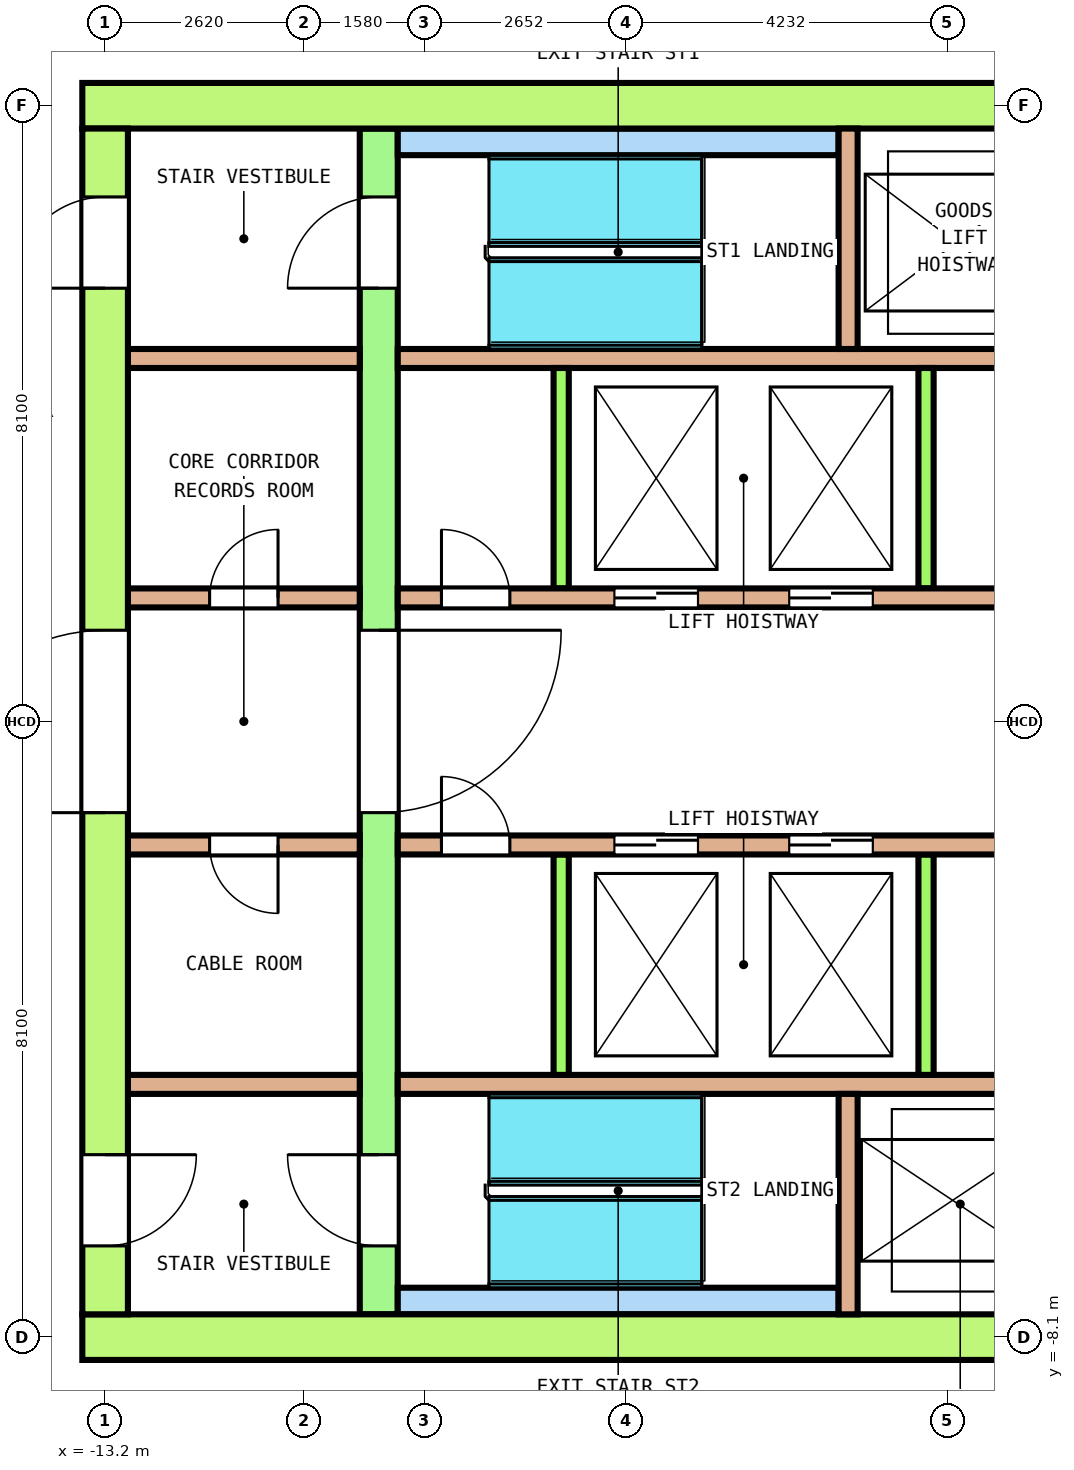
"""IFC4 building model, lengths in metres.
Left out: names, types, materials, properties, quantities, classifications, styles, units other than length and angle.
Written with IfcOpenShell. Run it as: python <this file> out.ifc"""

import sys

from ifc_helpers import new_model, si_unit, direction, frame, frame_2d, origin, place, context, subcontext, project, spatial, rectangle, extrude, element, fill, save


model = new_model("IFC4")
c1 = context("Model", 3, precision=1e-05, world=origin(), true_north=direction((0.0, 1.0)))
c2 = subcontext(c1, "Body", "Model", "MODEL_VIEW")
j1 = project(units=[si_unit("LENGTHUNIT", "METRE"), si_unit("PLANEANGLEUNIT", "RADIAN")], contexts=[c1])
p1 = place(None, origin())
s1 = spatial("IfcSite", under=j1, at=p1, CompositionType="ELEMENT")
p2 = place(p1, origin())
s2 = spatial("IfcBuilding", under=s1, at=p2, CompositionType="ELEMENT")
p3 = place(p2, frame((0.0, 0.0, 219.4)))
s3 = spatial("IfcBuildingStorey", under=s2, at=p3, CompositionType="ELEMENT", Elevation=219.4)
p4 = place(p3, frame((-13.5, 8.1, 0.0), z_axis=(0.0, 0.0, 1.0), x_axis=(1.0, 0.0, 0.0)))
e1 = element("IfcWall", 1, at=p4, inside=s3, PredefinedType="SHEAR", context=c2, shape_type="SweptSolid", body=[
    extrude(rectangle(XDim=27.0, YDim=0.6, at=frame_2d((13.5, 0.0))), origin(), (0.0, 0.0, 1.0), 3.7),
])
p5 = place(p4, frame((14.425, 0.0, 0.0)))
e2 = element("IfcOpeningElement", 2, at=p5, cuts=e1, PredefinedType="OPENING", context=c2, shape_type="SweptSolid", body=[
    extrude(rectangle(XDim=1.4, YDim=2.1, at=frame_2d((0.7, 1.05))), frame((0.0, 0.31, 0.0), z_axis=(0.0, -1.0, 0.0), x_axis=(1.0, 0.0, 0.0)), (0.0, 0.0, 1.0), 0.62),
])
p6 = place(p3, frame((-13.5, -8.1, 0.0), z_axis=(0.0, 0.0, 1.0), x_axis=(1.0, 0.0, 0.0)))
e3 = element("IfcWall", 3, at=p6, inside=s3, PredefinedType="SHEAR", context=c2, shape_type="SweptSolid", body=[
    extrude(rectangle(XDim=27.0, YDim=0.6, at=frame_2d((13.5, 0.0))), origin(), (0.0, 0.0, 1.0), 3.7),
])
p7 = place(p6, frame((15.05, 0.0, 0.0)))
e4 = element("IfcOpeningElement", 4, at=p7, cuts=e3, PredefinedType="OPENING", context=c2, shape_type="SweptSolid", body=[
    extrude(rectangle(XDim=1.2, YDim=2.1, at=frame_2d((0.6, 1.05))), frame((0.0, 0.31, 0.0), z_axis=(0.0, -1.0, 0.0), x_axis=(1.0, 0.0, 0.0)), (0.0, 0.0, 1.0), 0.62),
])
p8 = place(p3, frame((-13.2, -7.8, 0.0), z_axis=(0.0, 0.0, 1.0), x_axis=(0.0, 1.0, 0.0)))
e5 = element("IfcWall", 5, at=p8, inside=s3, PredefinedType="SHEAR", context=c2, shape_type="SweptSolid", body=[
    extrude(rectangle(XDim=15.6, YDim=0.6, at=frame_2d((7.8, 0.0))), origin(), (0.0, 0.0, 1.0), 3.7),
])
p9 = place(p8, frame((6.6, 0.0, 0.0)))
e6 = element("IfcOpeningElement", 6, at=p9, cuts=e5, PredefinedType="OPENING", context=c2, shape_type="SweptSolid", body=[
    extrude(rectangle(XDim=2.4, YDim=2.1, at=frame_2d((1.2, 1.05))), frame((0.0, 0.31, 0.0), z_axis=(0.0, -1.0, 0.0), x_axis=(1.0, 0.0, 0.0)), (0.0, 0.0, 1.0), 0.62),
])
p10 = place(p8, frame((13.5, 0.0, 0.0)))
e7 = element("IfcOpeningElement", 7, at=p10, cuts=e5, PredefinedType="OPENING", context=c2, shape_type="SweptSolid", body=[
    extrude(rectangle(XDim=1.2, YDim=2.1, at=frame_2d((0.6, 1.05))), frame((0.0, 0.31, 0.0), z_axis=(0.0, -1.0, 0.0), x_axis=(1.0, 0.0, 0.0)), (0.0, 0.0, 1.0), 0.62),
])
p11 = place(p8, frame((0.9, 0.0, 0.0)))
e8 = element("IfcOpeningElement", 8, at=p11, cuts=e5, PredefinedType="OPENING", context=c2, shape_type="SweptSolid", body=[
    extrude(rectangle(XDim=1.2, YDim=2.1, at=frame_2d((0.6, 1.05))), frame((0.0, 0.31, 0.0), z_axis=(0.0, -1.0, 0.0), x_axis=(1.0, 0.0, 0.0)), (0.0, 0.0, 1.0), 0.62),
])
p12 = place(p3, frame((-9.6, -7.8, 0.0), z_axis=(0.0, 0.0, 1.0), x_axis=(0.0, 1.0, 0.0)))
e9 = element("IfcWall", 9, at=p12, inside=s3, PredefinedType="SHEAR", context=c2, shape_type="SweptSolid", body=[
    extrude(rectangle(XDim=15.6, YDim=0.5, at=frame_2d((7.8, 0.0))), origin(), (0.0, 0.0, 1.0), 3.7),
])
p13 = place(p12, frame((6.6, 0.0, 0.0)))
e10 = element("IfcOpeningElement", 10, at=p13, cuts=e9, PredefinedType="OPENING", context=c2, shape_type="SweptSolid", body=[
    extrude(rectangle(XDim=2.4, YDim=2.1, at=frame_2d((1.2, 1.05))), frame((0.0, 0.26, 0.0), z_axis=(0.0, -1.0, 0.0), x_axis=(1.0, 0.0, 0.0)), (0.0, 0.0, 1.0), 0.52),
])
p14 = place(p12, frame((13.5, 0.0, 0.0)))
e11 = element("IfcOpeningElement", 11, at=p14, cuts=e9, PredefinedType="OPENING", context=c2, shape_type="SweptSolid", body=[
    extrude(rectangle(XDim=1.2, YDim=2.1, at=frame_2d((0.6, 1.05))), frame((0.0, 0.26, 0.0), z_axis=(0.0, -1.0, 0.0), x_axis=(1.0, 0.0, 0.0)), (0.0, 0.0, 1.0), 0.52),
])
p15 = place(p12, frame((0.9, 0.0, 0.0)))
e12 = element("IfcOpeningElement", 12, at=p15, cuts=e9, PredefinedType="OPENING", context=c2, shape_type="SweptSolid", body=[
    extrude(rectangle(XDim=1.2, YDim=2.1, at=frame_2d((0.6, 1.05))), frame((0.0, 0.26, 0.0), z_axis=(0.0, -1.0, 0.0), x_axis=(1.0, 0.0, 0.0)), (0.0, 0.0, 1.0), 0.52),
])
p16 = place(p3, frame((-12.9, 1.625, 0.0), z_axis=(0.0, 0.0, 1.0), x_axis=(1.0, 0.0, 0.0)))
e13 = element("IfcWall", 13, at=p16, inside=s3, PredefinedType="SOLIDWALL", context=c2, shape_type="SweptSolid", body=[
    extrude(rectangle(XDim=3.05, YDim=0.25, at=frame_2d((1.525, 0.0))), origin(), (0.0, 0.0, 1.0), 3.7),
])
p17 = place(p16, frame((1.075, 0.0, 0.0)))
e14 = element("IfcOpeningElement", 14, at=p17, cuts=e13, PredefinedType="OPENING", context=c2, shape_type="SweptSolid", body=[
    extrude(rectangle(XDim=0.9, YDim=2.1, at=frame_2d((0.45, 1.05))), frame((0.0, 0.135, 0.0), z_axis=(0.0, -1.0, 0.0), x_axis=(1.0, 0.0, 0.0)), (0.0, 0.0, 1.0), 0.27),
])
p18 = place(p3, frame((-9.35, 1.625, 0.0), z_axis=(0.0, 0.0, 1.0), x_axis=(1.0, 0.0, 0.0)))
e15 = element("IfcWall", 15, at=p18, inside=s3, PredefinedType="SOLIDWALL", context=c2, shape_type="SweptSolid", body=[
    extrude(rectangle(XDim=18.7, YDim=0.25, at=frame_2d((9.35, 0.0))), origin(), (0.0, 0.0, 1.0), 3.7),
])
p19 = place(p18, frame((2.85, 0.0, 0.0)))
e16 = element("IfcOpeningElement", 16, at=p19, cuts=e15, PredefinedType="OPENING", context=c2, shape_type="SweptSolid", body=[
    extrude(rectangle(XDim=1.1, YDim=2.1, at=frame_2d((0.55, 1.05))), frame((0.0, 0.135, 0.0), z_axis=(0.0, -1.0, 0.0), x_axis=(1.0, 0.0, 0.0)), (0.0, 0.0, 1.0), 0.27),
])
p20 = place(p18, frame((5.15, 0.0, 0.0)))
e17 = element("IfcOpeningElement", 17, at=p20, cuts=e15, PredefinedType="OPENING", context=c2, shape_type="SweptSolid", body=[
    extrude(rectangle(XDim=1.1, YDim=2.1, at=frame_2d((0.55, 1.05))), frame((0.0, 0.135, 0.0), z_axis=(0.0, -1.0, 0.0), x_axis=(1.0, 0.0, 0.0)), (0.0, 0.0, 1.0), 0.27),
])
p21 = place(p18, frame((14.8, 0.0, 0.0)))
e18 = element("IfcOpeningElement", 18, at=p21, cuts=e15, PredefinedType="OPENING", context=c2, shape_type="SweptSolid", body=[
    extrude(rectangle(XDim=1.1, YDim=2.1, at=frame_2d((0.55, 1.05))), frame((0.0, 0.135, 0.0), z_axis=(0.0, -1.0, 0.0), x_axis=(1.0, 0.0, 0.0)), (0.0, 0.0, 1.0), 0.27),
])
p22 = place(p18, frame((0.575, 0.0, 0.0)))
e19 = element("IfcOpeningElement", 19, at=p22, cuts=e15, PredefinedType="OPENING", context=c2, shape_type="SweptSolid", body=[
    extrude(rectangle(XDim=0.9, YDim=2.1, at=frame_2d((0.45, 1.05))), frame((0.0, 0.135, 0.0), z_axis=(0.0, -1.0, 0.0), x_axis=(1.0, 0.0, 0.0)), (0.0, 0.0, 1.0), 0.27),
])
p23 = place(p18, frame((17.225, 0.0, 0.0)))
e20 = element("IfcOpeningElement", 20, at=p23, cuts=e15, PredefinedType="OPENING", context=c2, shape_type="SweptSolid", body=[
    extrude(rectangle(XDim=0.9, YDim=2.1, at=frame_2d((0.45, 1.05))), frame((0.0, 0.135, 0.0), z_axis=(0.0, -1.0, 0.0), x_axis=(1.0, 0.0, 0.0)), (0.0, 0.0, 1.0), 0.27),
])
p24 = place(p3, frame((-12.9, 4.775, 0.0), z_axis=(0.0, 0.0, 1.0), x_axis=(1.0, 0.0, 0.0)))
e21 = element("IfcWall", 21, at=p24, inside=s3, PredefinedType="SOLIDWALL", context=c2, shape_type="SweptSolid", body=[
    extrude(rectangle(XDim=3.05, YDim=0.25, at=frame_2d((1.525, 0.0))), origin(), (0.0, 0.0, 1.0), 3.7),
])
p25 = place(p3, frame((-9.35, 4.775, 0.0), z_axis=(0.0, 0.0, 1.0), x_axis=(1.0, 0.0, 0.0)))
e22 = element("IfcWall", 22, at=p25, inside=s3, PredefinedType="SOLIDWALL", context=c2, shape_type="SweptSolid", body=[
    extrude(rectangle(XDim=18.7, YDim=0.25, at=frame_2d((9.35, 0.0))), origin(), (0.0, 0.0, 1.0), 3.7),
])
for number, where, z_axis, x_axis in (
    (23, (-7.2, 1.75, 0.0), (0.0, 0.0, 1.0), (0.0, 1.0, 0.0)),
    (24, (-2.4, 1.75, 0.0), (0.0, 0.0, 1.0), (0.0, 1.0, 0.0)),
):
    element("IfcWall", number, at=place(p3, frame(where, z_axis=z_axis, x_axis=x_axis)), inside=s3, PredefinedType="SOLIDWALL", context=c2, shape_type="SweptSolid", body=[
        extrude(rectangle(XDim=2.9, YDim=0.2, at=frame_2d((1.45, 0.0))), origin(), (0.0, 0.0, 1.0), 3.7),
    ])
p26 = place(p3, frame((-12.9, -1.625, 0.0), z_axis=(0.0, 0.0, 1.0), x_axis=(1.0, 0.0, 0.0)))
e25 = element("IfcWall", 25, at=p26, inside=s3, PredefinedType="SOLIDWALL", context=c2, shape_type="SweptSolid", body=[
    extrude(rectangle(XDim=3.05, YDim=0.25, at=frame_2d((1.525, 0.0))), origin(), (0.0, 0.0, 1.0), 3.7),
])
p27 = place(p26, frame((1.075, 0.0, 0.0)))
e26 = element("IfcOpeningElement", 26, at=p27, cuts=e25, PredefinedType="OPENING", context=c2, shape_type="SweptSolid", body=[
    extrude(rectangle(XDim=0.9, YDim=2.1, at=frame_2d((0.45, 1.05))), frame((0.0, 0.135, 0.0), z_axis=(0.0, -1.0, 0.0), x_axis=(1.0, 0.0, 0.0)), (0.0, 0.0, 1.0), 0.27),
])
p28 = place(p3, frame((-9.35, -1.625, 0.0), z_axis=(0.0, 0.0, 1.0), x_axis=(1.0, 0.0, 0.0)))
e27 = element("IfcWall", 27, at=p28, inside=s3, PredefinedType="SOLIDWALL", context=c2, shape_type="SweptSolid", body=[
    extrude(rectangle(XDim=18.7, YDim=0.25, at=frame_2d((9.35, 0.0))), origin(), (0.0, 0.0, 1.0), 3.7),
])
p29 = place(p28, frame((2.85, 0.0, 0.0)))
e28 = element("IfcOpeningElement", 28, at=p29, cuts=e27, PredefinedType="OPENING", context=c2, shape_type="SweptSolid", body=[
    extrude(rectangle(XDim=1.1, YDim=2.1, at=frame_2d((0.55, 1.05))), frame((0.0, 0.135, 0.0), z_axis=(0.0, -1.0, 0.0), x_axis=(1.0, 0.0, 0.0)), (0.0, 0.0, 1.0), 0.27),
])
p30 = place(p28, frame((5.15, 0.0, 0.0)))
e29 = element("IfcOpeningElement", 29, at=p30, cuts=e27, PredefinedType="OPENING", context=c2, shape_type="SweptSolid", body=[
    extrude(rectangle(XDim=1.1, YDim=2.1, at=frame_2d((0.55, 1.05))), frame((0.0, 0.135, 0.0), z_axis=(0.0, -1.0, 0.0), x_axis=(1.0, 0.0, 0.0)), (0.0, 0.0, 1.0), 0.27),
])
p31 = place(p28, frame((14.8, 0.0, 0.0)))
e30 = element("IfcOpeningElement", 30, at=p31, cuts=e27, PredefinedType="OPENING", context=c2, shape_type="SweptSolid", body=[
    extrude(rectangle(XDim=1.1, YDim=2.1, at=frame_2d((0.55, 1.05))), frame((0.0, 0.135, 0.0), z_axis=(0.0, -1.0, 0.0), x_axis=(1.0, 0.0, 0.0)), (0.0, 0.0, 1.0), 0.27),
])
p32 = place(p28, frame((0.575, 0.0, 0.0)))
e31 = element("IfcOpeningElement", 31, at=p32, cuts=e27, PredefinedType="OPENING", context=c2, shape_type="SweptSolid", body=[
    extrude(rectangle(XDim=0.9, YDim=2.1, at=frame_2d((0.45, 1.05))), frame((0.0, 0.135, 0.0), z_axis=(0.0, -1.0, 0.0), x_axis=(1.0, 0.0, 0.0)), (0.0, 0.0, 1.0), 0.27),
])
p33 = place(p28, frame((17.225, 0.0, 0.0)))
e32 = element("IfcOpeningElement", 32, at=p33, cuts=e27, PredefinedType="OPENING", context=c2, shape_type="SweptSolid", body=[
    extrude(rectangle(XDim=0.9, YDim=2.1, at=frame_2d((0.45, 1.05))), frame((0.0, 0.135, 0.0), z_axis=(0.0, -1.0, 0.0), x_axis=(1.0, 0.0, 0.0)), (0.0, 0.0, 1.0), 0.27),
])
p34 = place(p3, frame((-12.9, -4.775, 0.0), z_axis=(0.0, 0.0, 1.0), x_axis=(1.0, 0.0, 0.0)))
e33 = element("IfcWall", 33, at=p34, inside=s3, PredefinedType="SOLIDWALL", context=c2, shape_type="SweptSolid", body=[
    extrude(rectangle(XDim=3.05, YDim=0.25, at=frame_2d((1.525, 0.0))), origin(), (0.0, 0.0, 1.0), 3.7),
])
p35 = place(p3, frame((-9.35, -4.775, 0.0), z_axis=(0.0, 0.0, 1.0), x_axis=(1.0, 0.0, 0.0)))
e34 = element("IfcWall", 34, at=p35, inside=s3, PredefinedType="SOLIDWALL", context=c2, shape_type="SweptSolid", body=[
    extrude(rectangle(XDim=18.7, YDim=0.25, at=frame_2d((9.35, 0.0))), origin(), (0.0, 0.0, 1.0), 3.7),
])
for number, where, z_axis, x_axis in (
    (35, (-7.2, -4.65, 0.0), (0.0, 0.0, 1.0), (0.0, 1.0, 0.0)),
    (36, (-2.4, -4.65, 0.0), (0.0, 0.0, 1.0), (0.0, 1.0, 0.0)),
):
    element("IfcWall", number, at=place(p3, frame(where, z_axis=z_axis, x_axis=x_axis)), inside=s3, PredefinedType="SOLIDWALL", context=c2, shape_type="SweptSolid", body=[
        extrude(rectangle(XDim=2.9, YDim=0.2, at=frame_2d((1.45, 0.0))), origin(), (0.0, 0.0, 1.0), 3.7),
    ])
p36 = place(p3, frame((-9.35, 7.625, 0.0), z_axis=(0.0, 0.0, 1.0), x_axis=(1.0, 0.0, 0.0)))
e37 = element("IfcWall", 37, at=p36, inside=s3, PredefinedType="SOLIDWALL", context=c2, shape_type="SweptSolid", body=[
    extrude(rectangle(XDim=5.8, YDim=0.35, at=frame_2d((2.9, 0.0))), origin(), (0.0, 0.0, 1.0), 3.7),
])
p37 = place(p3, frame((-3.425, 4.9, 0.0), z_axis=(0.0, 0.0, 1.0), x_axis=(0.0, 1.0, 0.0)))
e38 = element("IfcWall", 38, at=p37, inside=s3, PredefinedType="SOLIDWALL", context=c2, shape_type="SweptSolid", body=[
    extrude(rectangle(XDim=2.9, YDim=0.25, at=frame_2d((1.45, 0.0))), origin(), (0.0, 0.0, 1.0), 3.7),
])
p38 = place(p3, frame((-9.35, -7.625, 0.0), z_axis=(0.0, 0.0, 1.0), x_axis=(1.0, 0.0, 0.0)))
e39 = element("IfcWall", 39, at=p38, inside=s3, PredefinedType="SOLIDWALL", context=c2, shape_type="SweptSolid", body=[
    extrude(rectangle(XDim=5.8, YDim=0.35, at=frame_2d((2.9, 0.0))), origin(), (0.0, 0.0, 1.0), 3.7),
])
p39 = place(p3, frame((-3.425, -7.8, 0.0), z_axis=(0.0, 0.0, 1.0), x_axis=(0.0, 1.0, 0.0)))
e40 = element("IfcWall", 40, at=p39, inside=s3, PredefinedType="SOLIDWALL", context=c2, shape_type="SweptSolid", body=[
    extrude(rectangle(XDim=2.9, YDim=0.25, at=frame_2d((1.45, 0.0))), origin(), (0.0, 0.0, 1.0), 3.7),
])
p40 = place(p19, origin())
e41 = element("IfcDoor", 41, at=p40, inside=s3, OperationType="DOUBLE_DOOR_SLIDING", PredefinedType="DOOR", context=c2, shape_type="SweptSolid", body=[
    extrude(rectangle(XDim=1.1, YDim=2.1, at=frame_2d((0.55, 1.05))), frame((0.0, 0.075, 0.0), z_axis=(0.0, -1.0, 0.0), x_axis=(1.0, 0.0, 0.0)), (0.0, 0.0, 1.0), 0.15),
])
fill(e16, e41)
p41 = place(p20, origin())
e42 = element("IfcDoor", 42, at=p41, inside=s3, OperationType="DOUBLE_DOOR_SLIDING", PredefinedType="DOOR", context=c2, shape_type="SweptSolid", body=[
    extrude(rectangle(XDim=1.1, YDim=2.1, at=frame_2d((0.55, 1.05))), frame((0.0, 0.075, 0.0), z_axis=(0.0, -1.0, 0.0), x_axis=(1.0, 0.0, 0.0)), (0.0, 0.0, 1.0), 0.15),
])
fill(e17, e42)
p42 = place(p29, origin())
e43 = element("IfcDoor", 43, at=p42, inside=s3, OperationType="DOUBLE_DOOR_SLIDING", PredefinedType="DOOR", context=c2, shape_type="SweptSolid", body=[
    extrude(rectangle(XDim=1.1, YDim=2.1, at=frame_2d((0.55, 1.05))), frame((0.0, 0.075, 0.0), z_axis=(0.0, -1.0, 0.0), x_axis=(1.0, 0.0, 0.0)), (0.0, 0.0, 1.0), 0.15),
])
fill(e28, e43)
p43 = place(p30, origin())
e44 = element("IfcDoor", 44, at=p43, inside=s3, OperationType="DOUBLE_DOOR_SLIDING", PredefinedType="DOOR", context=c2, shape_type="SweptSolid", body=[
    extrude(rectangle(XDim=1.1, YDim=2.1, at=frame_2d((0.55, 1.05))), frame((0.0, 0.075, 0.0), z_axis=(0.0, -1.0, 0.0), x_axis=(1.0, 0.0, 0.0)), (0.0, 0.0, 1.0), 0.15),
])
fill(e29, e44)
p44 = place(p13, origin())
e45 = element("IfcDoor", 45, at=p44, inside=s3, OperationType="DOUBLE_DOOR_SINGLE_SWING", PredefinedType="DOOR", context=c2, shape_type="SweptSolid", body=[
    extrude(rectangle(XDim=2.4, YDim=2.1, at=frame_2d((1.2, 1.05))), frame((0.0, 0.2, 0.0), z_axis=(0.0, -1.0, 0.0), x_axis=(1.0, 0.0, 0.0)), (0.0, 0.0, 1.0), 0.4),
])
fill(e10, e45)
p45 = place(p9, origin())
e46 = element("IfcDoor", 46, at=p45, inside=s3, OperationType="DOUBLE_DOOR_SINGLE_SWING", PredefinedType="DOOR", context=c2, shape_type="SweptSolid", body=[
    extrude(rectangle(XDim=2.4, YDim=2.1, at=frame_2d((1.2, 1.05))), frame((0.0, 0.25, 0.0), z_axis=(0.0, -1.0, 0.0), x_axis=(1.0, 0.0, 0.0)), (0.0, 0.0, 1.0), 0.5),
])
fill(e6, e46)
p46 = place(p14, origin())
e47 = element("IfcDoor", 47, at=p46, inside=s3, OperationType="SINGLE_SWING_RIGHT", PredefinedType="DOOR", context=c2, shape_type="SweptSolid", body=[
    extrude(rectangle(XDim=1.2, YDim=2.1, at=frame_2d((0.6, 1.05))), frame((0.0, 0.2, 0.0), z_axis=(0.0, -1.0, 0.0), x_axis=(1.0, 0.0, 0.0)), (0.0, 0.0, 1.0), 0.4),
])
fill(e11, e47)
p47 = place(p10, origin())
e48 = element("IfcDoor", 48, at=p47, inside=s3, OperationType="SINGLE_SWING_LEFT", PredefinedType="DOOR", context=c2, shape_type="SweptSolid", body=[
    extrude(rectangle(XDim=1.2, YDim=2.1, at=frame_2d((0.6, 1.05))), frame((0.0, 0.25, 0.0), z_axis=(0.0, -1.0, 0.0), x_axis=(1.0, 0.0, 0.0)), (0.0, 0.0, 1.0), 0.5),
])
fill(e7, e48)
p48 = place(p15, origin())
e49 = element("IfcDoor", 49, at=p48, inside=s3, OperationType="SINGLE_SWING_RIGHT", PredefinedType="DOOR", context=c2, shape_type="SweptSolid", body=[
    extrude(rectangle(XDim=1.2, YDim=2.1, at=frame_2d((0.6, 1.05))), frame((0.0, 0.2, 0.0), z_axis=(0.0, -1.0, 0.0), x_axis=(1.0, 0.0, 0.0)), (0.0, 0.0, 1.0), 0.4),
])
fill(e12, e49)
p49 = place(p11, origin())
e50 = element("IfcDoor", 50, at=p49, inside=s3, OperationType="SINGLE_SWING_LEFT", PredefinedType="DOOR", context=c2, shape_type="SweptSolid", body=[
    extrude(rectangle(XDim=1.2, YDim=2.1, at=frame_2d((0.6, 1.05))), frame((0.0, 0.25, 0.0), z_axis=(0.0, -1.0, 0.0), x_axis=(1.0, 0.0, 0.0)), (0.0, 0.0, 1.0), 0.5),
])
fill(e8, e50)
p50 = place(p17, origin())
e51 = element("IfcDoor", 51, at=p50, inside=s3, OperationType="SINGLE_SWING_RIGHT", PredefinedType="DOOR", context=c2, shape_type="SweptSolid", body=[
    extrude(rectangle(XDim=0.9, YDim=2.1, at=frame_2d((0.45, 1.05))), frame((0.0, 0.075, 0.0), z_axis=(0.0, -1.0, 0.0), x_axis=(1.0, 0.0, 0.0)), (0.0, 0.0, 1.0), 0.15),
])
fill(e14, e51)
p51 = place(p22, origin())
e52 = element("IfcDoor", 52, at=p51, inside=s3, OperationType="SINGLE_SWING_LEFT", PredefinedType="DOOR", context=c2, shape_type="SweptSolid", body=[
    extrude(rectangle(XDim=0.9, YDim=2.1, at=frame_2d((0.45, 1.05))), frame((0.0, 0.075, 0.0), z_axis=(0.0, -1.0, 0.0), x_axis=(1.0, 0.0, 0.0)), (0.0, 0.0, 1.0), 0.15),
])
fill(e19, e52)
p52 = place(p27, origin())
e53 = element("IfcDoor", 53, at=p52, inside=s3, OperationType="SINGLE_SWING_RIGHT", PredefinedType="DOOR", context=c2, shape_type="SweptSolid", body=[
    extrude(rectangle(XDim=0.9, YDim=2.1, at=frame_2d((0.45, 1.05))), frame((0.0, 0.075, 0.0), z_axis=(0.0, -1.0, 0.0), x_axis=(1.0, 0.0, 0.0)), (0.0, 0.0, 1.0), 0.15),
])
fill(e26, e53)
p53 = place(p32, origin())
e54 = element("IfcDoor", 54, at=p53, inside=s3, OperationType="SINGLE_SWING_LEFT", PredefinedType="DOOR", context=c2, shape_type="SweptSolid", body=[
    extrude(rectangle(XDim=0.9, YDim=2.1, at=frame_2d((0.45, 1.05))), frame((0.0, 0.075, 0.0), z_axis=(0.0, -1.0, 0.0), x_axis=(1.0, 0.0, 0.0)), (0.0, 0.0, 1.0), 0.15),
])
fill(e31, e54)
save(model, sys.argv[1])
